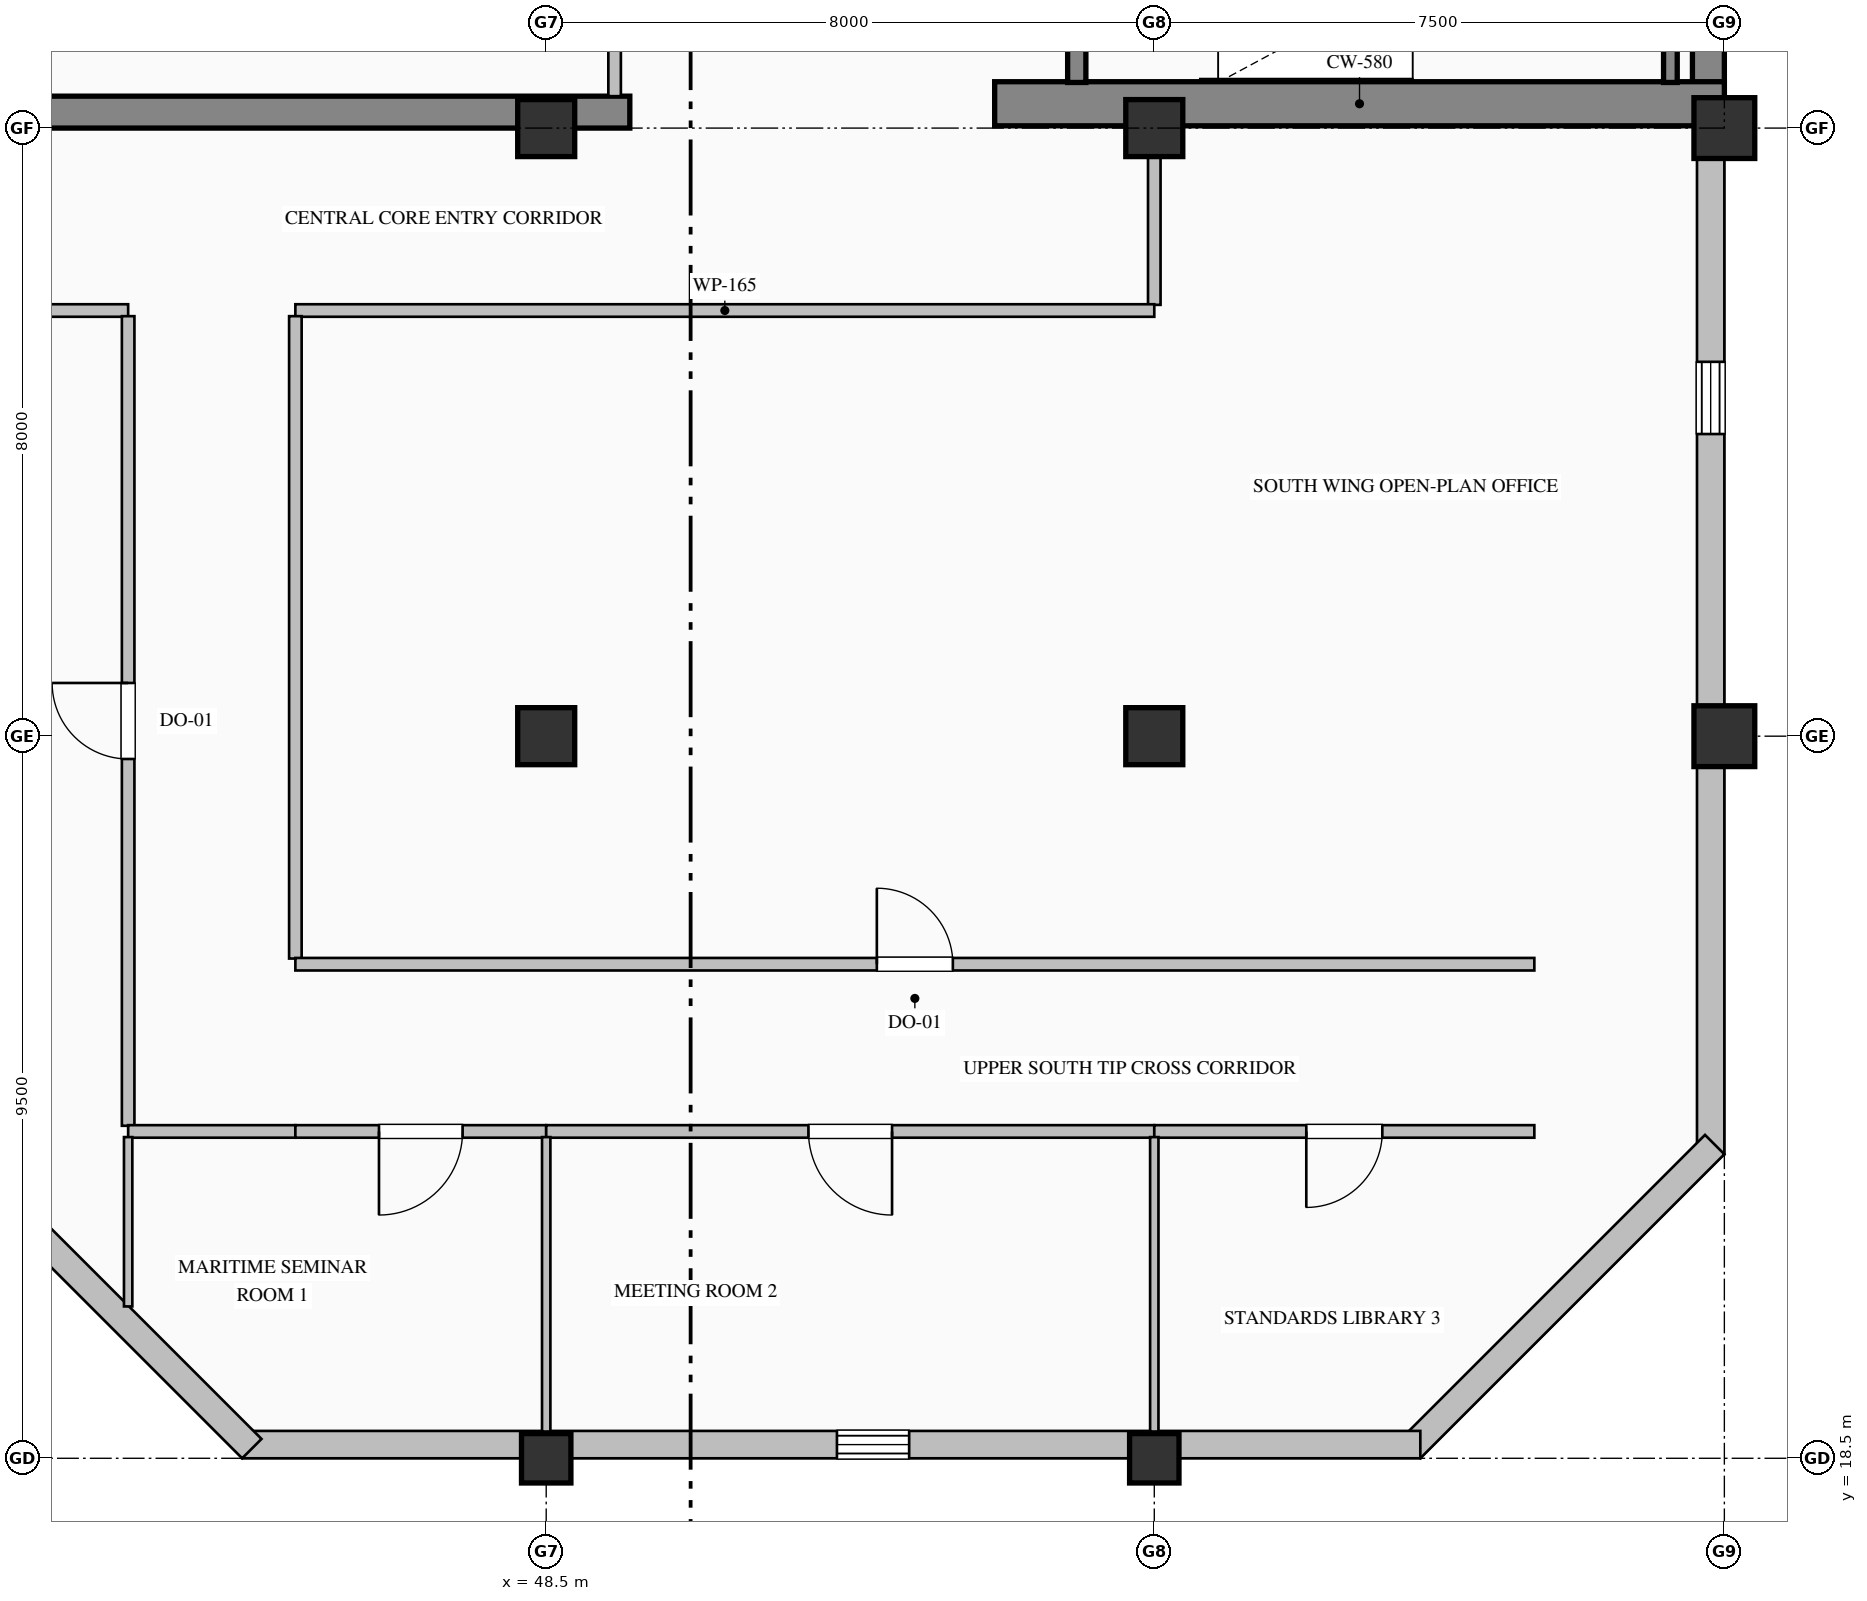
"""IFC4 building model, lengths in metres.
Left out: names, types, materials, properties, quantities, classifications, styles, units other than length and angle.
Written with IfcOpenShell. Run it as: python <this file> out.ifc"""

import sys

from ifc_helpers import new_model, si_unit, direction, frame, frame_2d, origin, origin_2d, place, context, subcontext, project, spatial, rectangle, hollow_rectangle, extrude, element, fill, save


model = new_model("IFC4")
c1 = context("Model", 3, precision=1e-05, world=origin(), true_north=direction((0.0, 1.0)))
c2 = subcontext(c1, "Body", "Model", "MODEL_VIEW")
j1 = project(units=[si_unit("LENGTHUNIT", "METRE"), si_unit("PLANEANGLEUNIT", "RADIAN")], contexts=[c1])
p1 = place(None, origin())
s1 = spatial("IfcSite", under=j1, at=p1, CompositionType="ELEMENT")
p2 = place(p1, origin())
s2 = spatial("IfcBuilding", under=s1, at=p2, CompositionType="ELEMENT")
p3 = place(p2, frame((0.0, 0.0, 311.2)))
s3 = spatial("IfcBuildingStorey", under=s2, at=p3, CompositionType="ELEMENT", Elevation=311.2)
p4 = place(p3, frame((63.79, 36.32, 0.0), z_axis=(0.0, 0.0, 1.0), x_axis=(0.0, 1.0, 0.0)))
e1 = element("IfcWall", 1, at=p4, inside=s3, PredefinedType="SHEAR", context=c2, shape_type="SweptSolid", body=[
    extrude(rectangle(XDim=15.26, YDim=0.42, at=frame_2d((7.63, 0.0))), origin(), (0.0, 0.0, 1.0), 3.785),
])
p5 = place(p3, frame((40.5, 36.21, 0.0), z_axis=(0.0, 0.0, 1.0), x_axis=(1.0, 0.0, 0.0)))
e2 = element("IfcWall", 2, at=p5, inside=s3, PredefinedType="SHEAR", context=c2, shape_type="SweptSolid", body=[
    extrude(rectangle(XDim=9.1, YDim=0.42, at=frame_2d((4.55, 0.0))), origin(), (0.0, 0.0, 1.0), 3.785),
])
p6 = place(p3, frame((54.4, 36.32, 0.0), z_axis=(0.0, 0.0, 1.0), x_axis=(1.0, 0.0, 0.0)))
e3 = element("IfcWall", 3, at=p6, inside=s3, PredefinedType="SHEAR", context=c2, shape_type="SweptSolid", body=[
    extrude(rectangle(XDim=9.6, YDim=0.58, at=frame_2d((4.8, 0.0))), origin(), (0.0, 0.0, 1.0), 4.0),
])
p7 = place(p3, frame((48.5, 18.5, 0.0), z_axis=(0.0, 0.0, 1.0), x_axis=(1.0, 0.0, 0.0)))
e4 = element("IfcColumn", 4, at=p7, inside=s3, PredefinedType="COLUMN", context=c2, shape_type="SweptSolid", body=[
    extrude(hollow_rectangle(XDim=0.65, YDim=0.65, WallThickness=0.028, at=origin_2d()), origin(), (0.0, 0.0, 1.0), 4.0),
])
for number, where, z_axis, x_axis in (
    (5, (48.5, 28.0, 0.0), (0.0, 0.0, 1.0), (1.0, 0.0, 0.0)),
    (6, (48.5, 36.0, 0.0), (0.0, 0.0, 1.0), (1.0, 0.0, 0.0)),
):
    element("IfcColumn", number, at=place(p3, frame(where, z_axis=z_axis, x_axis=x_axis)), inside=s3, PredefinedType="COLUMN", context=c2, shape_type="SweptSolid", body=[
        extrude(rectangle(XDim=0.75, YDim=0.75, at=origin_2d()), origin(), (0.0, 0.0, 1.0), 4.0),
    ])
p8 = place(p3, frame((56.5, 18.5, 0.0), z_axis=(0.0, 0.0, 1.0), x_axis=(1.0, 0.0, 0.0)))
e7 = element("IfcColumn", 7, at=p8, inside=s3, PredefinedType="COLUMN", context=c2, shape_type="SweptSolid", body=[
    extrude(hollow_rectangle(XDim=0.65, YDim=0.65, WallThickness=0.028, at=origin_2d()), origin(), (0.0, 0.0, 1.0), 4.0),
])
for number, where, z_axis, x_axis in (
    (8, (56.5, 28.0, 0.0), (0.0, 0.0, 1.0), (1.0, 0.0, 0.0)),
    (9, (56.5, 36.0, 0.0), (0.0, 0.0, 1.0), (1.0, 0.0, 0.0)),
):
    element("IfcColumn", number, at=place(p3, frame(where, z_axis=z_axis, x_axis=x_axis)), inside=s3, PredefinedType="COLUMN", context=c2, shape_type="SweptSolid", body=[
        extrude(rectangle(XDim=0.75, YDim=0.75, at=origin_2d()), origin(), (0.0, 0.0, 1.0), 4.0),
    ])
for number, where, z_axis, x_axis in (
    (10, (64.0, 28.0, 0.0), (0.0, 0.0, 1.0), (1.0, 0.0, 0.0)),
    (11, (64.0, 36.0, 0.0), (0.0, 0.0, 1.0), (1.0, 0.0, 0.0)),
):
    element("IfcColumn", number, at=place(p3, frame(where, z_axis=z_axis, x_axis=x_axis)), inside=s3, PredefinedType="COLUMN", context=c2, shape_type="SweptSolid", body=[
        extrude(hollow_rectangle(XDim=0.8, YDim=0.8, WallThickness=0.032, at=origin_2d()), origin(), (0.0, 0.0, 1.0), 4.0),
    ])
p9 = place(p3, frame((63.82, 36.05, 0.0), z_axis=(0.0, 0.0, 1.0), x_axis=(0.0, -1.0, 0.0)))
e12 = element("IfcWall", 12, at=p9, inside=s3, PredefinedType="SOLIDWALL", context=c2, shape_type="SweptSolid", body=[
    extrude(rectangle(XDim=13.55, YDim=0.36, at=frame_2d((6.775, 0.0))), origin(), (0.0, 0.0, 1.0), 3.335),
])
p10 = place(p9, frame((3.125, 0.0, 0.9)))
e13 = element("IfcOpeningElement", 13, at=p10, cuts=e12, PredefinedType="OPENING", context=c2, shape_type="SweptSolid", body=[
    extrude(rectangle(XDim=0.95, YDim=1.85, at=frame_2d((0.475, 0.925))), frame((0.0, 0.19, 0.0), z_axis=(0.0, -1.0, 0.0), x_axis=(1.0, 0.0, 0.0)), (0.0, 0.0, 1.0), 0.38),
])
p11 = place(p3, frame((63.873, 22.627, 0.0), z_axis=(0.0, 0.0, 1.0), x_axis=(-0.707106781187, -0.707106781187, 0.0)))
e14 = element("IfcWall", 14, at=p11, inside=s3, PredefinedType="SOLIDWALL", context=c2, shape_type="SweptSolid", body=[
    extrude(rectangle(XDim=5.657, YDim=0.36, at=frame_2d((2.828, 0.0))), origin(), (0.0, 0.0, 1.0), 3.785),
])
p12 = place(p3, frame((60.0, 18.68, 0.0), z_axis=(0.0, 0.0, 1.0), x_axis=(-1.0, 0.0, 0.0)))
e15 = element("IfcWall", 15, at=p12, inside=s3, PredefinedType="SOLIDWALL", context=c2, shape_type="SweptSolid", body=[
    extrude(rectangle(XDim=15.5, YDim=0.36, at=frame_2d((7.75, 0.0))), origin(), (0.0, 0.0, 1.0), 3.335),
])
p13 = place(p12, frame((6.725, 0.0, 0.9)))
e16 = element("IfcOpeningElement", 16, at=p13, cuts=e15, PredefinedType="OPENING", context=c2, shape_type="SweptSolid", body=[
    extrude(rectangle(XDim=0.95, YDim=1.85, at=frame_2d((0.475, 0.925))), frame((0.0, 0.19, 0.0), z_axis=(0.0, -1.0, 0.0), x_axis=(1.0, 0.0, 0.0)), (0.0, 0.0, 1.0), 0.38),
])
p14 = place(p3, frame((44.627, 18.627, 0.0), z_axis=(0.0, 0.0, 1.0), x_axis=(-0.707106781187, 0.707106781187, 0.0)))
e17 = element("IfcWall", 17, at=p14, inside=s3, PredefinedType="SOLIDWALL", context=c2, shape_type="SweptSolid", body=[
    extrude(rectangle(XDim=5.657, YDim=0.36, at=frame_2d((2.828, 0.0))), origin(), (0.0, 0.0, 1.0), 3.785),
])
p15 = place(p3, frame((55.48, 39.75, 0.0), z_axis=(0.0, 0.0, 1.0), x_axis=(0.0, -1.0, 0.0)))
e18 = element("IfcWall", 18, at=p15, inside=s3, PredefinedType="SOLIDWALL", context=c2, shape_type="SweptSolid", body=[
    extrude(rectangle(XDim=3.15, YDim=0.24, at=frame_2d((1.575, 0.0))), origin(), (0.0, 0.0, 1.0), 4.0),
])
p16 = place(p15, frame((1.0, 0.0, 0.0)))
e19 = element("IfcOpeningElement", 19, at=p16, cuts=e18, PredefinedType="OPENING", context=c2, shape_type="SweptSolid", body=[
    extrude(rectangle(XDim=1.15, YDim=2.2, at=frame_2d((0.575, 1.1))), frame((0.0, 0.13, 0.0), z_axis=(0.0, -1.0, 0.0), x_axis=(1.0, 0.0, 0.0)), (0.0, 0.0, 1.0), 0.26),
])
p17 = place(p3, frame((63.29, 36.6, 0.0), z_axis=(0.0, 0.0, 1.0), x_axis=(0.0, 1.0, 0.0)))
e20 = element("IfcWall", 20, at=p17, inside=s3, PredefinedType="SOLIDWALL", context=c2, shape_type="SweptSolid", body=[
    extrude(rectangle(XDim=3.15, YDim=0.18, at=frame_2d((1.575, 0.0))), origin(), (0.0, 0.0, 1.0), 4.0),
])
p18 = place(p3, frame((49.4, 36.42, 0.0), z_axis=(0.0, 0.0, 1.0), x_axis=(0.0, 1.0, 0.0)))
e21 = element("IfcWall", 21, at=p18, inside=s3, PredefinedType="PARTITIONING", context=c2, shape_type="SweptSolid", body=[
    extrude(rectangle(XDim=3.893, YDim=0.165, at=frame_2d((1.947, 0.0))), origin(), (0.0, 0.0, 1.0), 3.027),
])
p19 = place(p18, frame((1.497, 0.0, 0.0)))
e22 = element("IfcOpeningElement", 22, at=p19, cuts=e21, PredefinedType="OPENING", context=c2, shape_type="SweptSolid", body=[
    extrude(rectangle(XDim=0.9, YDim=2.15, at=frame_2d((0.45, 1.075))), frame((0.0, 0.093, 0.0), z_axis=(0.0, -1.0, 0.0), x_axis=(1.0, 0.0, 0.0)), (0.0, 0.0, 1.0), 0.185),
])
p20 = place(p3, frame((56.5, 36.0, 0.0), z_axis=(0.0, 0.0, 1.0), x_axis=(0.0, -1.0, 0.0)))
e23 = element("IfcWall", 23, at=p20, inside=s3, PredefinedType="PARTITIONING", context=c2, shape_type="SweptSolid", body=[
    extrude(rectangle(XDim=2.325, YDim=0.165, at=frame_2d((1.163, 0.0))), origin(), (0.0, 0.0, 1.0), 3.177),
])
p21 = place(p3, frame((56.5, 33.6, 0.0), z_axis=(0.0, 0.0, 1.0), x_axis=(-1.0, 0.0, 0.0)))
e24 = element("IfcWall", 24, at=p21, inside=s3, PredefinedType="PARTITIONING", context=c2, shape_type="SweptSolid", body=[
    extrude(rectangle(XDim=11.3, YDim=0.165, at=frame_2d((5.65, 0.0))), origin(), (0.0, 0.0, 1.0), 3.785),
])
p22 = place(p3, frame((43.0, 33.6, 0.0), z_axis=(0.0, 0.0, 1.0), x_axis=(-1.0, 0.0, 0.0)))
e25 = element("IfcWall", 25, at=p22, inside=s3, PredefinedType="PARTITIONING", context=c2, shape_type="SweptSolid", body=[
    extrude(rectangle(XDim=2.5, YDim=0.165, at=frame_2d((1.25, 0.0))), origin(), (0.0, 0.0, 1.0), 3.785),
])
p23 = place(p3, frame((45.2, 33.525, 0.0), z_axis=(0.0, 0.0, 1.0), x_axis=(0.0, -1.0, 0.0)))
e26 = element("IfcWall", 26, at=p23, inside=s3, PredefinedType="PARTITIONING", context=c2, shape_type="SweptSolid", body=[
    extrude(rectangle(XDim=8.451, YDim=0.165, at=frame_2d((4.226, 0.0))), origin(), (0.0, 0.0, 1.0), 3.785),
])
p24 = place(p3, frame((43.0, 22.875, 0.0), z_axis=(0.0, 0.0, 1.0), x_axis=(0.0, 1.0, 0.0)))
e27 = element("IfcWall", 27, at=p24, inside=s3, PredefinedType="PARTITIONING", context=c2, shape_type="SweptSolid", body=[
    extrude(rectangle(XDim=10.651, YDim=0.165, at=frame_2d((5.325, 0.0))), origin(), (0.0, 0.0, 1.0), 3.785),
])
p25 = place(p24, frame((4.825, 0.0, 0.0)))
e28 = element("IfcOpeningElement", 28, at=p25, cuts=e27, PredefinedType="OPENING", context=c2, shape_type="SweptSolid", body=[
    extrude(rectangle(XDim=1.0, YDim=2.15, at=frame_2d((0.5, 1.075))), frame((0.0, 0.093, 0.0), z_axis=(0.0, -1.0, 0.0), x_axis=(1.0, 0.0, 0.0)), (0.0, 0.0, 1.0), 0.185),
])
p26 = place(p3, frame((45.2, 22.8, 0.0), z_axis=(0.0, 0.0, 1.0), x_axis=(-1.0, 0.0, 0.0)))
e29 = element("IfcWall", 29, at=p26, inside=s3, PredefinedType="PARTITIONING", context=c2, shape_type="SweptSolid", body=[
    extrude(rectangle(XDim=2.2, YDim=0.165, at=frame_2d((1.1, 0.0))), origin(), (0.0, 0.0, 1.0), 3.785),
])
p27 = place(p3, frame((45.2, 25.0, 0.0), z_axis=(0.0, 0.0, 1.0), x_axis=(1.0, 0.0, 0.0)))
e30 = element("IfcWall", 30, at=p27, inside=s3, PredefinedType="PARTITIONING", context=c2, shape_type="SweptSolid", body=[
    extrude(rectangle(XDim=16.3, YDim=0.165, at=frame_2d((8.15, 0.0))), origin(), (0.0, 0.0, 1.0), 3.785),
])
p28 = place(p27, frame((7.65, 0.0, 0.0)))
e31 = element("IfcOpeningElement", 31, at=p28, cuts=e30, PredefinedType="OPENING", context=c2, shape_type="SweptSolid", body=[
    extrude(rectangle(XDim=1.0, YDim=2.15, at=frame_2d((0.5, 1.075))), frame((0.0, 0.093, 0.0), z_axis=(0.0, -1.0, 0.0), x_axis=(1.0, 0.0, 0.0)), (0.0, 0.0, 1.0), 0.185),
])
p29 = place(p3, frame((48.5, 22.8, 0.0), z_axis=(0.0, 0.0, 1.0), x_axis=(-1.0, 0.0, 0.0)))
e32 = element("IfcWall", 32, at=p29, inside=s3, PredefinedType="PARTITIONING", context=c2, shape_type="SweptSolid", body=[
    extrude(rectangle(XDim=3.3, YDim=0.165, at=frame_2d((1.65, 0.0))), origin(), (0.0, 0.0, 1.0), 3.785),
])
p30 = place(p29, frame((1.1, 0.0, 0.0)))
e33 = element("IfcOpeningElement", 33, at=p30, cuts=e32, PredefinedType="OPENING", context=c2, shape_type="SweptSolid", body=[
    extrude(rectangle(XDim=1.1, YDim=2.2, at=frame_2d((0.55, 1.1))), frame((0.0, 0.093, 0.0), z_axis=(0.0, -1.0, 0.0), x_axis=(1.0, 0.0, 0.0)), (0.0, 0.0, 1.0), 0.185),
])
p31 = place(p3, frame((56.5, 22.8, 0.0), z_axis=(0.0, 0.0, 1.0), x_axis=(-1.0, 0.0, 0.0)))
e34 = element("IfcWall", 34, at=p31, inside=s3, PredefinedType="PARTITIONING", context=c2, shape_type="SweptSolid", body=[
    extrude(rectangle(XDim=8.0, YDim=0.165, at=frame_2d((4.0, 0.0))), origin(), (0.0, 0.0, 1.0), 3.785),
])
p32 = place(p31, frame((3.45, 0.0, 0.0)))
e35 = element("IfcOpeningElement", 35, at=p32, cuts=e34, PredefinedType="OPENING", context=c2, shape_type="SweptSolid", body=[
    extrude(rectangle(XDim=1.1, YDim=2.2, at=frame_2d((0.55, 1.1))), frame((0.0, 0.093, 0.0), z_axis=(0.0, -1.0, 0.0), x_axis=(1.0, 0.0, 0.0)), (0.0, 0.0, 1.0), 0.185),
])
p33 = place(p3, frame((61.5, 22.8, 0.0), z_axis=(0.0, 0.0, 1.0), x_axis=(-1.0, 0.0, 0.0)))
e36 = element("IfcWall", 36, at=p33, inside=s3, PredefinedType="PARTITIONING", context=c2, shape_type="SweptSolid", body=[
    extrude(rectangle(XDim=5.0, YDim=0.165, at=frame_2d((2.5, 0.0))), origin(), (0.0, 0.0, 1.0), 3.785),
])
p34 = place(p33, frame((2.0, 0.0, 0.0)))
e37 = element("IfcOpeningElement", 37, at=p34, cuts=e36, PredefinedType="OPENING", context=c2, shape_type="SweptSolid", body=[
    extrude(rectangle(XDim=1.0, YDim=2.15, at=frame_2d((0.5, 1.075))), frame((0.0, 0.093, 0.0), z_axis=(0.0, -1.0, 0.0), x_axis=(1.0, 0.0, 0.0)), (0.0, 0.0, 1.0), 0.185),
])
p35 = place(p3, frame((43.0, 22.726, 0.0), z_axis=(0.0, 0.0, 1.0), x_axis=(0.0, -1.0, 0.0)))
e38 = element("IfcWall", 38, at=p35, inside=s3, PredefinedType="MOVABLE", context=c2, shape_type="SweptSolid", body=[
    extrude(rectangle(XDim=2.228, YDim=0.11, at=frame_2d((1.114, 0.0))), origin(), (0.0, 0.0, 1.0), 3.785),
])
for number, where, z_axis, x_axis in (
    (39, (48.5, 22.726, 0.0), (0.0, 0.0, 1.0), (0.0, -1.0, 0.0)),
    (40, (56.5, 22.726, 0.0), (0.0, 0.0, 1.0), (0.0, -1.0, 0.0)),
):
    element("IfcWall", number, at=place(p3, frame(where, z_axis=z_axis, x_axis=x_axis)), inside=s3, PredefinedType="MOVABLE", context=c2, shape_type="SweptSolid", body=[
        extrude(rectangle(XDim=3.874, YDim=0.11, at=frame_2d((1.937, 0.0))), origin(), (0.0, 0.0, 1.0), 2.977),
    ])
p36 = place(p10, origin())
e41 = element("IfcWindow", 41, at=p36, inside=s3, PartitioningType="SINGLE_PANEL", PredefinedType="WINDOW", context=c2, shape_type="SweptSolid", body=[
    extrude(rectangle(XDim=0.95, YDim=1.85, at=frame_2d((0.475, 0.925))), frame((0.0, 0.15, 0.0), z_axis=(0.0, -1.0, 0.0), x_axis=(1.0, 0.0, 0.0)), (0.0, 0.0, 1.0), 0.06),
])
fill(e13, e41)
p37 = place(p13, origin())
e42 = element("IfcWindow", 42, at=p37, inside=s3, PartitioningType="SINGLE_PANEL", PredefinedType="WINDOW", context=c2, shape_type="SweptSolid", body=[
    extrude(rectangle(XDim=0.95, YDim=1.85, at=frame_2d((0.475, 0.925))), frame((0.0, 0.15, 0.0), z_axis=(0.0, -1.0, 0.0), x_axis=(1.0, 0.0, 0.0)), (0.0, 0.0, 1.0), 0.06),
])
fill(e16, e42)
p38 = place(p28, origin())
e43 = element("IfcDoor", 43, at=p38, inside=s3, OperationType="SINGLE_SWING_LEFT", PredefinedType="DOOR", context=c2, shape_type="SweptSolid", body=[
    extrude(rectangle(XDim=1.0, YDim=2.15, at=frame_2d((0.5, 1.075))), frame((0.0, 0.025, 0.0), z_axis=(0.0, -1.0, 0.0), x_axis=(1.0, 0.0, 0.0)), (0.0, 0.0, 1.0), 0.05),
])
fill(e31, e43)
p39 = place(p25, origin())
e44 = element("IfcDoor", 44, at=p39, inside=s3, OperationType="SINGLE_SWING_RIGHT", PredefinedType="DOOR", context=c2, shape_type="SweptSolid", body=[
    extrude(rectangle(XDim=1.0, YDim=2.15, at=frame_2d((0.5, 1.075))), frame((0.0, 0.025, 0.0), z_axis=(0.0, -1.0, 0.0), x_axis=(1.0, 0.0, 0.0)), (0.0, 0.0, 1.0), 0.05),
])
fill(e28, e44)
p40 = place(p30, origin())
e45 = element("IfcDoor", 45, at=p40, inside=s3, OperationType="SINGLE_SWING_RIGHT", PredefinedType="DOOR", context=c2, shape_type="SweptSolid", body=[
    extrude(rectangle(XDim=1.1, YDim=2.2, at=frame_2d((0.55, 1.1))), frame((0.0, 0.025, 0.0), z_axis=(0.0, -1.0, 0.0), x_axis=(1.0, 0.0, 0.0)), (0.0, 0.0, 1.0), 0.05),
])
fill(e33, e45)
p41 = place(p32, origin())
e46 = element("IfcDoor", 46, at=p41, inside=s3, OperationType="SINGLE_SWING_LEFT", PredefinedType="DOOR", context=c2, shape_type="SweptSolid", body=[
    extrude(rectangle(XDim=1.1, YDim=2.2, at=frame_2d((0.55, 1.1))), frame((0.0, 0.025, 0.0), z_axis=(0.0, -1.0, 0.0), x_axis=(1.0, 0.0, 0.0)), (0.0, 0.0, 1.0), 0.05),
])
fill(e35, e46)
p42 = place(p34, origin())
e47 = element("IfcDoor", 47, at=p42, inside=s3, OperationType="SINGLE_SWING_RIGHT", PredefinedType="DOOR", context=c2, shape_type="SweptSolid", body=[
    extrude(rectangle(XDim=1.0, YDim=2.15, at=frame_2d((0.5, 1.075))), frame((0.0, 0.025, 0.0), z_axis=(0.0, -1.0, 0.0), x_axis=(1.0, 0.0, 0.0)), (0.0, 0.0, 1.0), 0.05),
])
fill(e37, e47)
save(model, sys.argv[1])
